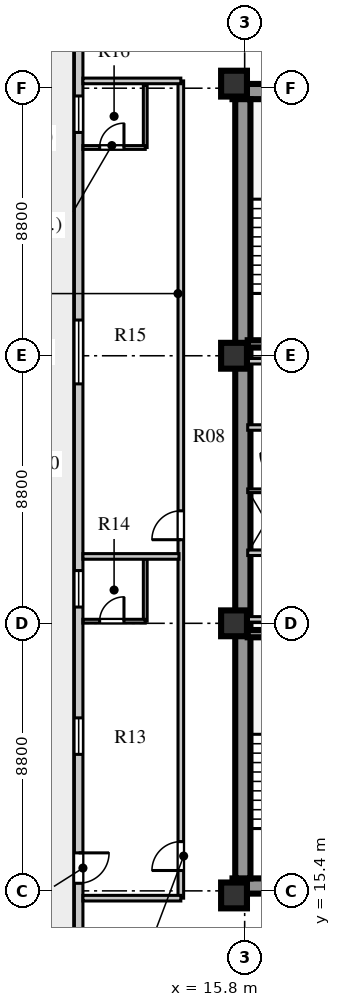
"""IFC4 building model, lengths in metres.
Left out: names, types, materials, properties, quantities, classifications, styles, units other than length and angle.
Written with IfcOpenShell. Run it as: python <this file> out.ifc"""

import sys

from ifc_helpers import new_model, si_unit, direction, frame, frame_2d, origin, origin_2d, place, context, subcontext, project, spatial, rectangle, extrude, element, fill, save


model = new_model("IFC4")
c1 = context("Model", 3, precision=1e-05, world=origin(), true_north=direction((0.0, 1.0)))
c2 = subcontext(c1, "Body", "Model", "MODEL_VIEW")
j1 = project(units=[si_unit("LENGTHUNIT", "METRE"), si_unit("PLANEANGLEUNIT", "RADIAN")], contexts=[c1])
p1 = place(None, origin())
s1 = spatial("IfcSite", under=j1, at=p1, CompositionType="ELEMENT")
p2 = place(p1, origin())
s2 = spatial("IfcBuilding", under=s1, at=p2, CompositionType="ELEMENT")
p3 = place(p2, frame((0.0, 0.0, 150.2)))
s3 = spatial("IfcBuildingStorey", under=s2, at=p3, CompositionType="ELEMENT", Elevation=150.2)
for number, where, z_axis, x_axis in (
    (1, (15.4, 15.56, 0.0), (0.0, 0.0, 1.0), (1.0, 0.0, 0.0)),
    (2, (15.4, 41.69, 0.0), (0.0, 0.0, 1.0), (1.0, 0.0, 0.0)),
):
    element("IfcWall", number, at=place(p3, frame(where, z_axis=z_axis, x_axis=x_axis)), inside=s3, PredefinedType="SHEAR", context=c2, shape_type="SweptSolid", body=[
        extrude(rectangle(XDim=9.68, YDim=0.5, at=frame_2d((4.84, 0.0))), origin(), (0.0, 0.0, 1.0), 3.55),
    ])
p4 = place(p3, frame((15.74, 15.81, 0.0), z_axis=(0.0, 0.0, 1.0), x_axis=(0.0, 1.0, 0.0)))
e3 = element("IfcWall", 3, at=p4, inside=s3, PredefinedType="SHEAR", context=c2, shape_type="SweptSolid", body=[
    extrude(rectangle(XDim=25.63, YDim=0.5, at=frame_2d((12.815, 0.0))), origin(), (0.0, 0.0, 1.0), 3.55),
])
for number, where, z_axis, x_axis in (
    (4, (15.45, 15.25, 0.0), (0.0, 0.0, 1.0), (1.0, 0.0, 0.0)),
    (5, (15.45, 24.2, 0.0), (0.0, 0.0, 1.0), (1.0, 0.0, 0.0)),
    (6, (15.45, 33.0, 0.0), (0.0, 0.0, 1.0), (1.0, 0.0, 0.0)),
    (7, (15.45, 41.95, 0.0), (0.0, 0.0, 1.0), (1.0, 0.0, 0.0)),
):
    element("IfcColumn", number, at=place(p3, frame(where, z_axis=z_axis, x_axis=x_axis)), inside=s3, PredefinedType="COLUMN", context=c2, shape_type="SweptSolid", body=[
        extrude(rectangle(XDim=0.85, YDim=0.85, at=origin_2d()), origin(), (0.0, 0.0, 1.0), 3.55),
    ])
p5 = place(p3, frame((10.34, 43.87, 0.0), z_axis=(0.0, 0.0, 1.0), x_axis=(0.0, -1.0, 0.0)))
e8 = element("IfcWall", 8, at=p5, inside=s3, PredefinedType="STANDARD", context=c2, shape_type="SweptSolid", body=[
    extrude(rectangle(XDim=30.54, YDim=0.28, at=frame_2d((15.27, 0.0))), origin(), (0.0, 0.0, 1.0), 3.55),
])
p6 = place(p5, frame((27.22, 0.0, 0.0)))
e9 = element("IfcOpeningElement", 9, at=p6, cuts=e8, PredefinedType="OPENING", context=c2, shape_type="SweptSolid", body=[
    extrude(rectangle(XDim=1.0, YDim=2.05, at=frame_2d((0.5, 1.025))), frame((0.0, 0.15, 0.0), z_axis=(0.0, -1.0, 0.0), x_axis=(1.0, 0.0, 0.0)), (0.0, 0.0, 1.0), 0.3),
])
p7 = place(p5, frame((22.78, 0.0, 0.8)))
e10 = element("IfcOpeningElement", 10, at=p7, cuts=e8, PredefinedType="OPENING", context=c2, shape_type="SweptSolid", body=[
    extrude(rectangle(XDim=1.2, YDim=1.75, at=frame_2d((0.6, 0.875))), frame((0.0, 0.15, 0.0), z_axis=(0.0, -1.0, 0.0), x_axis=(1.0, 0.0, 0.0)), (0.0, 0.0, 1.0), 0.3),
])
p8 = place(p5, frame((17.935, 0.0, 0.8)))
e11 = element("IfcOpeningElement", 11, at=p8, cuts=e8, PredefinedType="OPENING", context=c2, shape_type="SweptSolid", body=[
    extrude(rectangle(XDim=1.2, YDim=1.75, at=frame_2d((0.6, 0.875))), frame((0.0, 0.15, 0.0), z_axis=(0.0, -1.0, 0.0), x_axis=(1.0, 0.0, 0.0)), (0.0, 0.0, 1.0), 0.3),
])
p9 = place(p5, frame((9.695, 0.0, 0.8)))
e12 = element("IfcOpeningElement", 12, at=p9, cuts=e8, PredefinedType="OPENING", context=c2, shape_type="SweptSolid", body=[
    extrude(rectangle(XDim=2.1, YDim=1.95, at=frame_2d((1.05, 0.975))), frame((0.0, 0.15, 0.0), z_axis=(0.0, -1.0, 0.0), x_axis=(1.0, 0.0, 0.0)), (0.0, 0.0, 1.0), 0.3),
])
p10 = place(p5, frame((2.325, 0.0, 0.8)))
e13 = element("IfcOpeningElement", 13, at=p10, cuts=e8, PredefinedType="OPENING", context=c2, shape_type="SweptSolid", body=[
    extrude(rectangle(XDim=1.2, YDim=1.75, at=frame_2d((0.6, 0.875))), frame((0.0, 0.15, 0.0), z_axis=(0.0, -1.0, 0.0), x_axis=(1.0, 0.0, 0.0)), (0.0, 0.0, 1.0), 0.3),
])
p11 = place(p3, frame((15.9, 23.86, 0.0), z_axis=(0.0, 0.0, 1.0), x_axis=(1.0, 0.0, 0.0)))
e14 = element("IfcWall", 14, at=p11, inside=s3, PredefinedType="SHEAR", context=c2, shape_type="SweptSolid", body=[
    extrude(rectangle(XDim=3.52, YDim=0.24, at=frame_2d((1.76, 0.0))), origin(), (0.0, 0.0, 1.0), 3.85),
])
p12 = place(p3, frame((15.9, 26.52, 0.0), z_axis=(0.0, 0.0, 1.0), x_axis=(1.0, 0.0, 0.0)))
e15 = element("IfcWall", 15, at=p12, inside=s3, PredefinedType="SOLIDWALL", context=c2, shape_type="SweptSolid", body=[
    extrude(rectangle(XDim=8.68, YDim=0.18, at=frame_2d((4.34, 0.0))), origin(), (0.0, 0.0, 1.0), 3.55),
])
p13 = place(p12, frame((3.3, 0.0, 0.0)))
e16 = element("IfcOpeningElement", 16, at=p13, cuts=e15, PredefinedType="OPENING", context=c2, shape_type="SweptSolid", body=[
    extrude(rectangle(XDim=0.95, YDim=2.1, at=frame_2d((0.475, 1.05))), frame((0.0, 0.1, 0.0), z_axis=(0.0, -1.0, 0.0), x_axis=(1.0, 0.0, 0.0)), (0.0, 0.0, 1.0), 0.2),
])
p14 = place(p3, frame((15.9, 24.33, 0.0), z_axis=(0.0, 0.0, 1.0), x_axis=(1.0, 0.0, 0.0)))
e17 = element("IfcWall", 17, at=p14, inside=s3, PredefinedType="SOLIDWALL", context=c2, shape_type="SweptSolid", body=[
    extrude(rectangle(XDim=8.68, YDim=0.18, at=frame_2d((4.34, 0.0))), origin(), (0.0, 0.0, 1.0), 2.9),
])
p15 = place(p3, frame((15.9, 28.56, 0.0), z_axis=(0.0, 0.0, 1.0), x_axis=(1.0, 0.0, 0.0)))
e18 = element("IfcWall", 18, at=p15, inside=s3, PredefinedType="PARTITIONING", context=c2, shape_type="SweptSolid", body=[
    extrude(rectangle(XDim=1.2, YDim=0.12, at=frame_2d((0.6, 0.0))), origin(), (0.0, 0.0, 1.0), 3.55),
])
p16 = place(p3, frame((15.9, 30.64, 0.0), z_axis=(0.0, 0.0, 1.0), x_axis=(1.0, 0.0, 0.0)))
e19 = element("IfcWall", 19, at=p16, inside=s3, PredefinedType="SOLIDWALL", context=c2, shape_type="SweptSolid", body=[
    extrude(rectangle(XDim=8.68, YDim=0.18, at=frame_2d((4.34, 0.0))), origin(), (0.0, 0.0, 1.0), 3.55),
])
p17 = place(p16, frame((1.76, 0.0, 0.0)))
e20 = element("IfcOpeningElement", 20, at=p17, cuts=e19, PredefinedType="OPENING", context=c2, shape_type="SweptSolid", body=[
    extrude(rectangle(XDim=1.0, YDim=2.1, at=frame_2d((0.5, 1.05))), frame((0.0, 0.1, 0.0), z_axis=(0.0, -1.0, 0.0), x_axis=(1.0, 0.0, 0.0)), (0.0, 0.0, 1.0), 0.2),
])
p18 = place(p16, frame((3.6, 0.0, 0.0)))
e21 = element("IfcOpeningElement", 21, at=p18, cuts=e19, PredefinedType="OPENING", context=c2, shape_type="SweptSolid", body=[
    extrude(rectangle(XDim=1.0, YDim=2.1, at=frame_2d((0.5, 1.05))), frame((0.0, 0.1, 0.0), z_axis=(0.0, -1.0, 0.0), x_axis=(1.0, 0.0, 0.0)), (0.0, 0.0, 1.0), 0.2),
])
p19 = place(p16, frame((5.44, 0.0, 0.0)))
e22 = element("IfcOpeningElement", 22, at=p19, cuts=e19, PredefinedType="OPENING", context=c2, shape_type="SweptSolid", body=[
    extrude(rectangle(XDim=1.0, YDim=2.1, at=frame_2d((0.5, 1.05))), frame((0.0, 0.1, 0.0), z_axis=(0.0, -1.0, 0.0), x_axis=(1.0, 0.0, 0.0)), (0.0, 0.0, 1.0), 0.2),
])
p20 = place(p16, frame((7.28, 0.0, 0.0)))
e23 = element("IfcOpeningElement", 23, at=p20, cuts=e19, PredefinedType="OPENING", context=c2, shape_type="SweptSolid", body=[
    extrude(rectangle(XDim=1.0, YDim=2.1, at=frame_2d((0.5, 1.05))), frame((0.0, 0.1, 0.0), z_axis=(0.0, -1.0, 0.0), x_axis=(1.0, 0.0, 0.0)), (0.0, 0.0, 1.0), 0.2),
])
p21 = place(p3, frame((15.9, 32.82, 0.0), z_axis=(0.0, 0.0, 1.0), x_axis=(1.0, 0.0, 0.0)))
e24 = element("IfcWall", 24, at=p21, inside=s3, PredefinedType="SOLIDWALL", context=c2, shape_type="SweptSolid", body=[
    extrude(rectangle(XDim=8.68, YDim=0.18, at=frame_2d((4.34, 0.0))), origin(), (0.0, 0.0, 1.0), 2.9),
])
p22 = place(p3, frame((15.9, 33.39, 0.0), z_axis=(0.0, 0.0, 1.0), x_axis=(1.0, 0.0, 0.0)))
e25 = element("IfcWall", 25, at=p22, inside=s3, PredefinedType="SHEAR", context=c2, shape_type="SweptSolid", body=[
    extrude(rectangle(XDim=3.52, YDim=0.24, at=frame_2d((1.76, 0.0))), origin(), (0.0, 0.0, 1.0), 3.85),
])
p23 = place(p3, frame((13.7, 15.16, 0.0), z_axis=(0.0, 0.0, 1.0), x_axis=(0.0, 1.0, 0.0)))
e26 = element("IfcWall", 26, at=p23, inside=s3, PredefinedType="SOLIDWALL", context=c2, shape_type="SweptSolid", body=[
    extrude(rectangle(XDim=26.88, YDim=0.185, at=frame_2d((13.44, 0.0))), origin(), (0.0, 0.0, 1.0), 3.55),
])
p24 = place(p23, frame((0.91, 0.0, 0.0)))
e27 = element("IfcOpeningElement", 27, at=p24, cuts=e26, PredefinedType="OPENING", context=c2, shape_type="SweptSolid", body=[
    extrude(rectangle(XDim=0.95, YDim=2.1, at=frame_2d((0.475, 1.05))), frame((0.0, 0.103, 0.0), z_axis=(0.0, -1.0, 0.0), x_axis=(1.0, 0.0, 0.0)), (0.0, 0.0, 1.0), 0.205),
])
p25 = place(p23, frame((11.79, 0.0, 0.0)))
e28 = element("IfcOpeningElement", 28, at=p25, cuts=e26, PredefinedType="OPENING", context=c2, shape_type="SweptSolid", body=[
    extrude(rectangle(XDim=0.95, YDim=2.1, at=frame_2d((0.475, 1.05))), frame((0.0, 0.103, 0.0), z_axis=(0.0, -1.0, 0.0), x_axis=(1.0, 0.0, 0.0)), (0.0, 0.0, 1.0), 0.205),
])
for number, where, z_axis, x_axis in (
    (29, (10.48, 15.16, 0.0), (0.0, 0.0, 1.0), (1.0, 0.0, 0.0)),
    (30, (10.48, 42.04, 0.0), (0.0, 0.0, 1.0), (1.0, 0.0, 0.0)),
):
    element("IfcWall", number, at=place(p3, frame(where, z_axis=z_axis, x_axis=x_axis)), inside=s3, PredefinedType="SOLIDWALL", context=c2, shape_type="SweptSolid", body=[
        extrude(rectangle(XDim=3.22, YDim=0.185, at=frame_2d((1.61, 0.0))), origin(), (0.0, 0.0, 1.0), 3.05),
    ])
p26 = place(p3, frame((12.53, 24.27, 0.0), z_axis=(0.0, 0.0, 1.0), x_axis=(0.0, 1.0, 0.0)))
e31 = element("IfcWall", 31, at=p26, inside=s3, PredefinedType="PLUMBINGWALL", context=c2, shape_type="SweptSolid", body=[
    extrude(rectangle(XDim=2.05, YDim=0.125, at=frame_2d((1.025, 0.0))), origin(), (0.0, 0.0, 1.0), 3.55),
])
p27 = place(p3, frame((10.48, 24.27, 0.0), z_axis=(0.0, 0.0, 1.0), x_axis=(1.0, 0.0, 0.0)))
e32 = element("IfcWall", 32, at=p27, inside=s3, PredefinedType="PLUMBINGWALL", context=c2, shape_type="SweptSolid", body=[
    extrude(rectangle(XDim=2.05, YDim=0.125, at=frame_2d((1.025, 0.0))), origin(), (0.0, 0.0, 1.0), 3.05),
])
p28 = place(p27, frame((0.55, 0.0, 0.0)))
e33 = element("IfcOpeningElement", 33, at=p28, cuts=e32, PredefinedType="OPENING", context=c2, shape_type="SweptSolid", body=[
    extrude(rectangle(XDim=0.8, YDim=2.05, at=frame_2d((0.4, 1.025))), frame((0.0, 0.073, 0.0), z_axis=(0.0, -1.0, 0.0), x_axis=(1.0, 0.0, 0.0)), (0.0, 0.0, 1.0), 0.145),
])
p29 = place(p3, frame((10.48, 26.4, 0.0), z_axis=(0.0, 0.0, 1.0), x_axis=(1.0, 0.0, 0.0)))
e34 = element("IfcWall", 34, at=p29, inside=s3, PredefinedType="SOLIDWALL", context=c2, shape_type="SweptSolid", body=[
    extrude(rectangle(XDim=3.16, YDim=0.185, at=frame_2d((1.58, 0.0))), origin(), (0.0, 0.0, 1.0), 3.55),
])
p30 = place(p3, frame((12.53, 39.85, 0.0), z_axis=(0.0, 0.0, 1.0), x_axis=(0.0, 1.0, 0.0)))
e35 = element("IfcWall", 35, at=p30, inside=s3, PredefinedType="PLUMBINGWALL", context=c2, shape_type="SweptSolid", body=[
    extrude(rectangle(XDim=2.05, YDim=0.125, at=frame_2d((1.025, 0.0))), origin(), (0.0, 0.0, 1.0), 3.55),
])
p31 = place(p3, frame((10.48, 39.85, 0.0), z_axis=(0.0, 0.0, 1.0), x_axis=(1.0, 0.0, 0.0)))
e36 = element("IfcWall", 36, at=p31, inside=s3, PredefinedType="PLUMBINGWALL", context=c2, shape_type="SweptSolid", body=[
    extrude(rectangle(XDim=2.05, YDim=0.125, at=frame_2d((1.025, 0.0))), origin(), (0.0, 0.0, 1.0), 3.55),
])
p32 = place(p31, frame((0.55, 0.0, 0.0)))
e37 = element("IfcOpeningElement", 37, at=p32, cuts=e36, PredefinedType="OPENING", context=c2, shape_type="SweptSolid", body=[
    extrude(rectangle(XDim=0.8, YDim=2.05, at=frame_2d((0.4, 1.025))), frame((0.0, 0.073, 0.0), z_axis=(0.0, -1.0, 0.0), x_axis=(1.0, 0.0, 0.0)), (0.0, 0.0, 1.0), 0.145),
])
p33 = place(p6, frame((1.0, 0.0, 0.0), z_axis=(0.0, 0.0, 1.0), x_axis=(-1.0, 0.0, 0.0)))
e38 = element("IfcDoor", 38, at=p33, inside=s3, OperationType="SINGLE_SWING_RIGHT", PredefinedType="DOOR", context=c2, shape_type="SweptSolid", body=[
    extrude(rectangle(XDim=1.0, YDim=2.05, at=frame_2d((0.5, 1.025))), frame((0.0, 0.025, 0.0), z_axis=(0.0, -1.0, 0.0), x_axis=(1.0, 0.0, 0.0)), (0.0, 0.0, 1.0), 0.05),
])
fill(e9, e38)
p34 = place(p7, origin())
e39 = element("IfcWindow", 39, at=p34, inside=s3, PartitioningType="SINGLE_PANEL", PredefinedType="WINDOW", context=c2, shape_type="SweptSolid", body=[
    extrude(rectangle(XDim=1.2, YDim=1.75, at=frame_2d((0.6, 0.875))), frame((0.0, 0.03, 0.0), z_axis=(0.0, -1.0, 0.0), x_axis=(1.0, 0.0, 0.0)), (0.0, 0.0, 1.0), 0.06),
])
fill(e10, e39)
p35 = place(p8, origin())
e40 = element("IfcWindow", 40, at=p35, inside=s3, PartitioningType="SINGLE_PANEL", PredefinedType="WINDOW", context=c2, shape_type="SweptSolid", body=[
    extrude(rectangle(XDim=1.2, YDim=1.75, at=frame_2d((0.6, 0.875))), frame((0.0, 0.03, 0.0), z_axis=(0.0, -1.0, 0.0), x_axis=(1.0, 0.0, 0.0)), (0.0, 0.0, 1.0), 0.06),
])
fill(e11, e40)
p36 = place(p9, origin())
e41 = element("IfcWindow", 41, at=p36, inside=s3, PartitioningType="SINGLE_PANEL", PredefinedType="WINDOW", context=c2, shape_type="SweptSolid", body=[
    extrude(rectangle(XDim=2.1, YDim=1.95, at=frame_2d((1.05, 0.975))), frame((0.0, 0.03, 0.0), z_axis=(0.0, -1.0, 0.0), x_axis=(1.0, 0.0, 0.0)), (0.0, 0.0, 1.0), 0.06),
])
fill(e12, e41)
p37 = place(p10, origin())
e42 = element("IfcWindow", 42, at=p37, inside=s3, PartitioningType="SINGLE_PANEL", PredefinedType="WINDOW", context=c2, shape_type="SweptSolid", body=[
    extrude(rectangle(XDim=1.2, YDim=1.75, at=frame_2d((0.6, 0.875))), frame((0.0, 0.03, 0.0), z_axis=(0.0, -1.0, 0.0), x_axis=(1.0, 0.0, 0.0)), (0.0, 0.0, 1.0), 0.06),
])
fill(e13, e42)
p38 = place(p24, origin())
e43 = element("IfcDoor", 43, at=p38, inside=s3, OperationType="SINGLE_SWING_LEFT", PredefinedType="DOOR", context=c2, shape_type="SweptSolid", body=[
    extrude(rectangle(XDim=0.95, YDim=2.1, at=frame_2d((0.475, 1.05))), frame((0.0, 0.025, 0.0), z_axis=(0.0, -1.0, 0.0), x_axis=(1.0, 0.0, 0.0)), (0.0, 0.0, 1.0), 0.05),
])
fill(e27, e43)
p39 = place(p28, frame((0.8, 0.0, 0.0), z_axis=(0.0, 0.0, 1.0), x_axis=(-1.0, 0.0, 0.0)))
e44 = element("IfcDoor", 44, at=p39, inside=s3, OperationType="SINGLE_SWING_LEFT", PredefinedType="DOOR", context=c2, shape_type="SweptSolid", body=[
    extrude(rectangle(XDim=0.8, YDim=2.05, at=frame_2d((0.4, 1.025))), frame((0.0, 0.025, 0.0), z_axis=(0.0, -1.0, 0.0), x_axis=(1.0, 0.0, 0.0)), (0.0, 0.0, 1.0), 0.05),
])
fill(e33, e44)
p40 = place(p25, origin())
e45 = element("IfcDoor", 45, at=p40, inside=s3, OperationType="SINGLE_SWING_LEFT", PredefinedType="DOOR", context=c2, shape_type="SweptSolid", body=[
    extrude(rectangle(XDim=0.95, YDim=2.1, at=frame_2d((0.475, 1.05))), frame((0.0, 0.025, 0.0), z_axis=(0.0, -1.0, 0.0), x_axis=(1.0, 0.0, 0.0)), (0.0, 0.0, 1.0), 0.05),
])
fill(e28, e45)
p41 = place(p32, frame((0.8, 0.0, 0.0), z_axis=(0.0, 0.0, 1.0), x_axis=(-1.0, 0.0, 0.0)))
e46 = element("IfcDoor", 46, at=p41, inside=s3, OperationType="SINGLE_SWING_LEFT", PredefinedType="DOOR", context=c2, shape_type="SweptSolid", body=[
    extrude(rectangle(XDim=0.8, YDim=2.05, at=frame_2d((0.4, 1.025))), frame((0.0, 0.025, 0.0), z_axis=(0.0, -1.0, 0.0), x_axis=(1.0, 0.0, 0.0)), (0.0, 0.0, 1.0), 0.05),
])
fill(e37, e46)
save(model, sys.argv[1])
